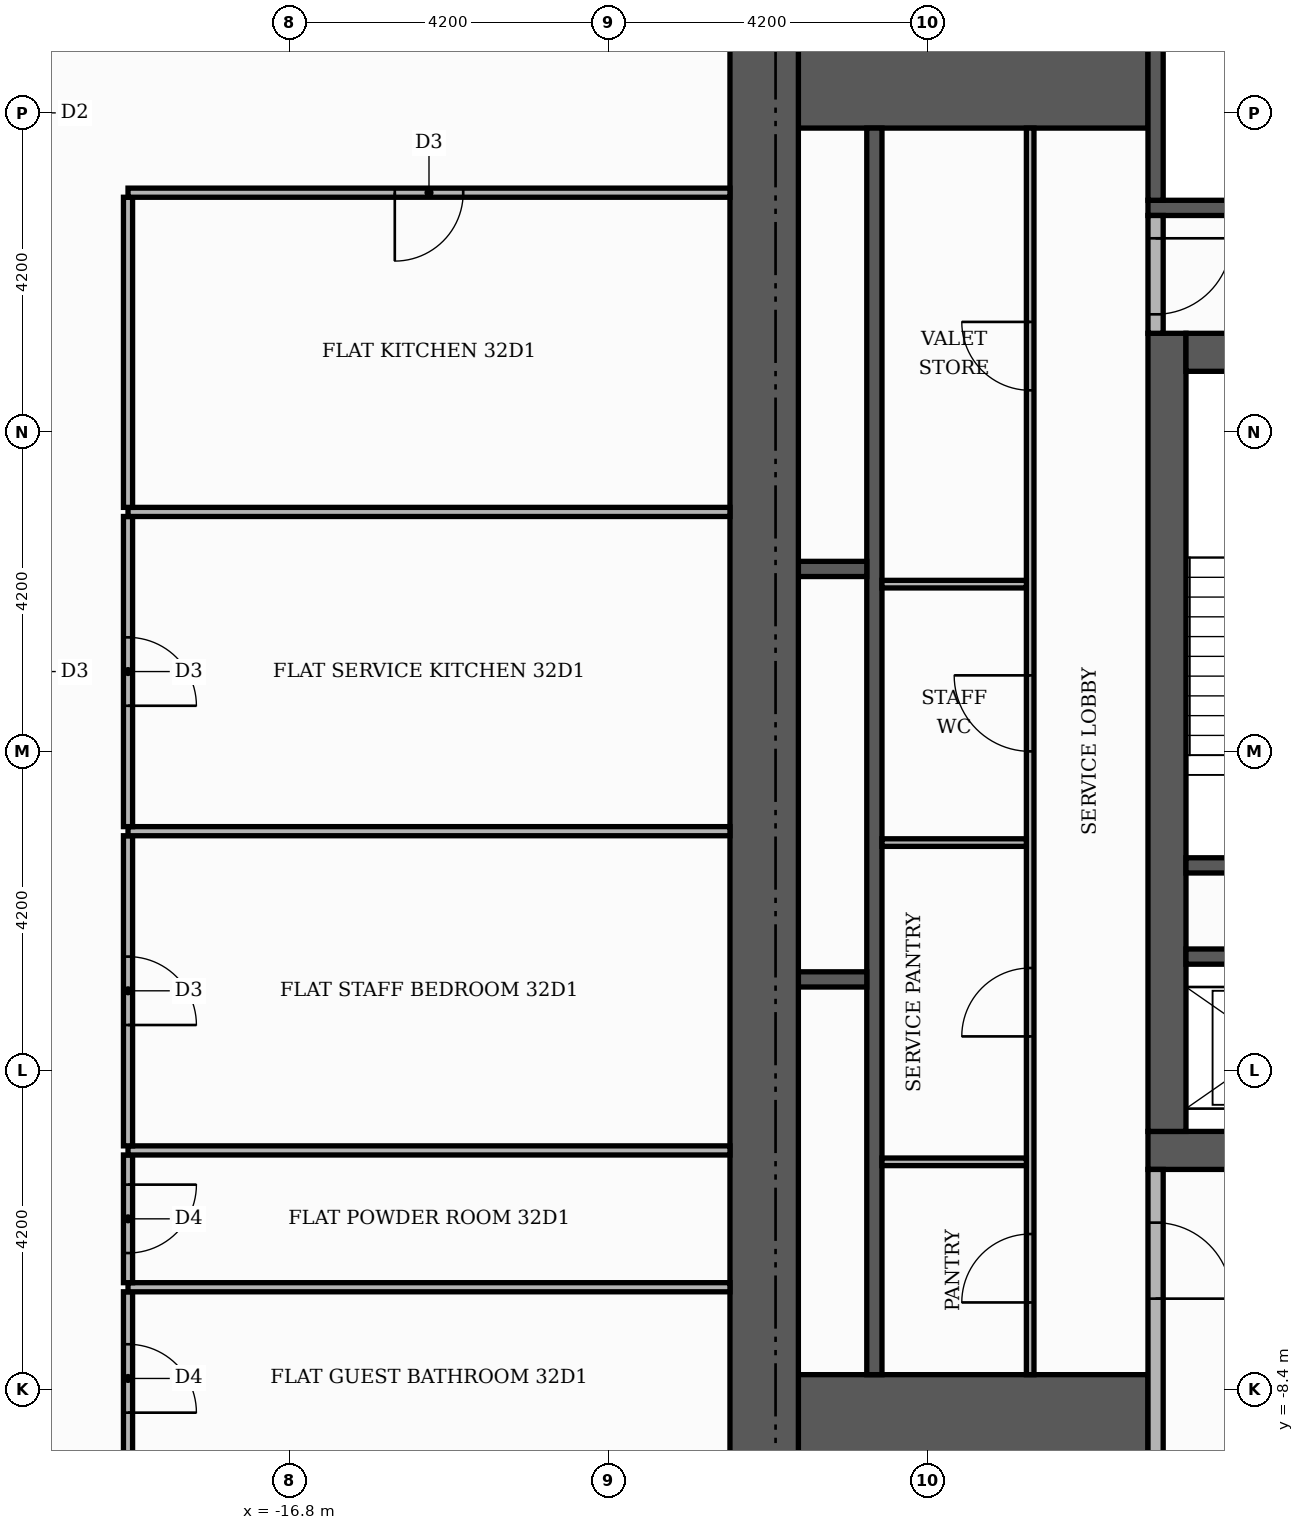
"""IFC4 building model, lengths in metres.
Left out: names, types, materials, properties, quantities, classifications, styles, units other than length and angle.
Written with IfcOpenShell. Run it as: python <this file> out.ifc"""

import sys

from ifc_helpers import new_model, si_unit, direction, frame, frame_2d, origin, place, context, subcontext, project, spatial, rectangle, extrude, element, fill, save


model = new_model("IFC4")
c1 = context("Model", 3, precision=1e-05, world=origin(), true_north=direction((0.0, 1.0)))
c2 = subcontext(c1, "Body", "Model", "MODEL_VIEW")
j1 = project(units=[si_unit("LENGTHUNIT", "METRE"), si_unit("PLANEANGLEUNIT", "RADIAN")], contexts=[c1])
p1 = place(None, origin())
s1 = spatial("IfcSite", under=j1, at=p1, CompositionType="ELEMENT")
p2 = place(p1, origin())
s2 = spatial("IfcBuilding", under=s1, at=p2, CompositionType="ELEMENT")
p3 = place(p2, frame((0.0, 0.0, 137.7)))
s3 = spatial("IfcBuildingStorey", under=s2, at=p3, CompositionType="ELEMENT", Elevation=137.7)
p4 = place(p3, frame((-5.5, -5.25, 0.0), z_axis=(0.0, 0.0, 1.0), x_axis=(1.0, 0.0, 0.0)))
e1 = element("IfcWall", 1, at=p4, inside=s3, PredefinedType="SHEAR", context=c2, shape_type="SweptSolid", body=[
    extrude(rectangle(XDim=11.0, YDim=0.5, at=frame_2d((5.5, 0.0))), origin(), (0.0, 0.0, 1.0), 3.48),
])
p5 = place(p4, frame((4.9, 0.0, 0.0)))
e2 = element("IfcOpeningElement", 2, at=p5, cuts=e1, PredefinedType="OPENING", context=c2, shape_type="SweptSolid", body=[
    extrude(rectangle(XDim=1.2, YDim=2.1, at=frame_2d((0.6, 1.05))), frame((0.0, 0.26, 0.0), z_axis=(0.0, -1.0, 0.0), x_axis=(1.0, 0.0, 0.0)), (0.0, 0.0, 1.0), 0.52),
])
p6 = place(p3, frame((-5.25, -5.0, 0.0), z_axis=(0.0, 0.0, 1.0), x_axis=(0.0, 1.0, 0.0)))
e3 = element("IfcWall", 3, at=p6, inside=s3, PredefinedType="SHEAR", context=c2, shape_type="SweptSolid", body=[
    extrude(rectangle(XDim=10.5, YDim=0.5, at=frame_2d((5.25, 0.0))), origin(), (0.0, 0.0, 1.0), 3.48),
])
p7 = place(p3, frame((-5.0, 5.25, 0.0), z_axis=(0.0, 0.0, 1.0), x_axis=(1.0, 0.0, 0.0)))
e4 = element("IfcWall", 4, at=p7, inside=s3, PredefinedType="SHEAR", context=c2, shape_type="SweptSolid", body=[
    extrude(rectangle(XDim=10.0, YDim=0.5, at=frame_2d((5.0, 0.0))), origin(), (0.0, 0.0, 1.0), 3.48),
])
p8 = place(p7, frame((4.4, 0.0, 0.0)))
e5 = element("IfcOpeningElement", 5, at=p8, cuts=e4, PredefinedType="OPENING", context=c2, shape_type="SweptSolid", body=[
    extrude(rectangle(XDim=1.2, YDim=2.1, at=frame_2d((0.6, 1.05))), frame((0.0, 0.26, 0.0), z_axis=(0.0, -1.0, 0.0), x_axis=(1.0, 0.0, 0.0)), (0.0, 0.0, 1.0), 0.52),
])
for number, where, z_axis, x_axis in (
    (6, (-10.1, -9.15, 0.0), (0.0, 0.0, 1.0), (1.0, 0.0, 0.0)),
    (7, (-10.1, 9.15, 0.0), (0.0, 0.0, 1.0), (1.0, 0.0, 0.0)),
):
    element("IfcWall", number, at=place(p3, frame(where, z_axis=z_axis, x_axis=x_axis)), inside=s3, PredefinedType="SHEAR", context=c2, shape_type="SweptSolid", body=[
        extrude(rectangle(XDim=4.6, YDim=1.9, at=frame_2d((2.3, 0.0))), origin(), (0.0, 0.0, 1.0), 3.48),
    ])
p9 = place(p3, frame((-5.0, -1.5, 0.0), z_axis=(0.0, 0.0, 1.0), x_axis=(1.0, 0.0, 0.0)))
e8 = element("IfcWall", 8, at=p9, inside=s3, PredefinedType="SHEAR", context=c2, shape_type="SweptSolid", body=[
    extrude(rectangle(XDim=3.05, YDim=0.2, at=frame_2d((1.525, 0.0))), origin(), (0.0, 0.0, 1.0), 3.48),
])
p10 = place(p3, frame((-5.5, 7.15, 0.0), z_axis=(0.0, 0.0, 1.0), x_axis=(1.0, 0.0, 0.0)))
e9 = element("IfcWall", 9, at=p10, inside=s3, PredefinedType="SHEAR", context=c2, shape_type="SweptSolid", body=[
    extrude(rectangle(XDim=6.8, YDim=0.2, at=frame_2d((3.4, 0.0))), origin(), (0.0, 0.0, 1.0), 3.48),
])
p11 = place(p3, frame((-5.4, 7.25, 0.0), z_axis=(0.0, 0.0, 1.0), x_axis=(0.0, 1.0, 0.0)))
e10 = element("IfcWall", 10, at=p11, inside=s3, PredefinedType="SHEAR", context=c2, shape_type="SweptSolid", body=[
    extrude(rectangle(XDim=2.85, YDim=0.2, at=frame_2d((1.425, 0.0))), origin(), (0.0, 0.0, 1.0), 3.48),
])
p12 = place(p3, frame((-9.1, -8.2, 0.0), z_axis=(0.0, 0.0, 1.0), x_axis=(0.0, 1.0, 0.0)))
e11 = element("IfcWall", 11, at=p12, inside=s3, PredefinedType="SHEAR", context=c2, shape_type="SweptSolid", body=[
    extrude(rectangle(XDim=16.4, YDim=0.2, at=frame_2d((8.2, 0.0))), origin(), (0.0, 0.0, 1.0), 3.48),
])
p13 = place(p3, frame((-10.1, -3.0, 0.0), z_axis=(0.0, 0.0, 1.0), x_axis=(1.0, 0.0, 0.0)))
e12 = element("IfcWall", 12, at=p13, inside=s3, PredefinedType="SHEAR", context=c2, shape_type="SweptSolid", body=[
    extrude(rectangle(XDim=0.9, YDim=0.2, at=frame_2d((0.45, 0.0))), origin(), (0.0, 0.0, 1.0), 3.48),
])
p14 = place(p3, frame((-5.0, -2.7, 0.0), z_axis=(0.0, 0.0, 1.0), x_axis=(1.0, 0.0, 0.0)))
e13 = element("IfcWall", 13, at=p14, inside=s3, PredefinedType="SHEAR", context=c2, shape_type="SweptSolid", body=[
    extrude(rectangle(XDim=2.85, YDim=0.2, at=frame_2d((1.425, 0.0))), origin(), (0.0, 0.0, 1.0), 3.48),
])
p15 = place(p3, frame((-10.1, 2.4, 0.0), z_axis=(0.0, 0.0, 1.0), x_axis=(1.0, 0.0, 0.0)))
e14 = element("IfcWall", 14, at=p15, inside=s3, PredefinedType="SHEAR", context=c2, shape_type="SweptSolid", body=[
    extrude(rectangle(XDim=0.9, YDim=0.2, at=frame_2d((0.45, 0.0))), origin(), (0.0, 0.0, 1.0), 3.48),
])
p16 = place(p3, frame((-10.55, -10.1, 0.0), z_axis=(0.0, 0.0, 1.0), x_axis=(0.0, 1.0, 0.0)))
e15 = element("IfcWall", 15, at=p16, inside=s3, PredefinedType="SHEAR", context=c2, shape_type="SweptSolid", body=[
    extrude(rectangle(XDim=20.2, YDim=0.9, at=frame_2d((10.1, 0.0))), origin(), (0.0, 0.0, 1.0), 3.48),
])
p17 = place(p3, frame((-5.4, -10.1, 0.0), z_axis=(0.0, 0.0, 1.0), x_axis=(0.0, 1.0, 0.0)))
e16 = element("IfcWall", 16, at=p17, inside=s3, PredefinedType="PARTITIONING", context=c2, shape_type="SweptSolid", body=[
    extrude(rectangle(XDim=4.6, YDim=0.2, at=frame_2d((2.3, 0.0))), origin(), (0.0, 0.0, 1.0), 3.48),
])
p18 = place(p17, frame((2.9, 0.0, 0.0)))
e17 = element("IfcOpeningElement", 17, at=p18, cuts=e16, PredefinedType="OPENING", context=c2, shape_type="SweptSolid", body=[
    extrude(rectangle(XDim=1.0, YDim=2.1, at=frame_2d((0.5, 1.05))), frame((0.0, 0.11, 0.0), z_axis=(0.0, -1.0, 0.0), x_axis=(1.0, 0.0, 0.0)), (0.0, 0.0, 1.0), 0.22),
])
p19 = place(p3, frame((-7.05, -8.2, 0.0), z_axis=(0.0, 0.0, 1.0), x_axis=(0.0, 1.0, 0.0)))
e18 = element("IfcWall", 18, at=p19, inside=s3, PredefinedType="PARTITIONING", context=c2, shape_type="SweptSolid", body=[
    extrude(rectangle(XDim=16.4, YDim=0.1, at=frame_2d((8.2, 0.0))), origin(), (0.0, 0.0, 1.0), 3.48),
])
p20 = place(p19, frame((0.95, 0.0, 0.0)))
e19 = element("IfcOpeningElement", 19, at=p20, cuts=e18, PredefinedType="OPENING", context=c2, shape_type="SweptSolid", body=[
    extrude(rectangle(XDim=0.9, YDim=2.1, at=frame_2d((0.45, 1.05))), frame((0.0, 0.06, 0.0), z_axis=(0.0, -1.0, 0.0), x_axis=(1.0, 0.0, 0.0)), (0.0, 0.0, 1.0), 0.12),
])
p21 = place(p19, frame((4.45, 0.0, 0.0)))
e20 = element("IfcOpeningElement", 20, at=p21, cuts=e18, PredefinedType="OPENING", context=c2, shape_type="SweptSolid", body=[
    extrude(rectangle(XDim=0.9, YDim=2.1, at=frame_2d((0.45, 1.05))), frame((0.0, 0.06, 0.0), z_axis=(0.0, -1.0, 0.0), x_axis=(1.0, 0.0, 0.0)), (0.0, 0.0, 1.0), 0.12),
])
p22 = place(p19, frame((8.2, 0.0, 0.0)))
e21 = element("IfcOpeningElement", 21, at=p22, cuts=e18, PredefinedType="OPENING", context=c2, shape_type="SweptSolid", body=[
    extrude(rectangle(XDim=1.0, YDim=2.1, at=frame_2d((0.5, 1.05))), frame((0.0, 0.06, 0.0), z_axis=(0.0, -1.0, 0.0), x_axis=(1.0, 0.0, 0.0)), (0.0, 0.0, 1.0), 0.12),
])
p23 = place(p19, frame((12.95, 0.0, 0.0)))
e22 = element("IfcOpeningElement", 22, at=p23, cuts=e18, PredefinedType="OPENING", context=c2, shape_type="SweptSolid", body=[
    extrude(rectangle(XDim=0.9, YDim=2.1, at=frame_2d((0.45, 1.05))), frame((0.0, 0.06, 0.0), z_axis=(0.0, -1.0, 0.0), x_axis=(1.0, 0.0, 0.0)), (0.0, 0.0, 1.0), 0.12),
])
for number, where, z_axis, x_axis in (
    (23, (-9.0, -5.4, 0.0), (0.0, 0.0, 1.0), (1.0, 0.0, 0.0)),
    (24, (-9.0, -1.2, 0.0), (0.0, 0.0, 1.0), (1.0, 0.0, 0.0)),
    (25, (-9.0, 2.2, 0.0), (0.0, 0.0, 1.0), (1.0, 0.0, 0.0)),
):
    element("IfcWall", number, at=place(p3, frame(where, z_axis=z_axis, x_axis=x_axis)), inside=s3, PredefinedType="PARTITIONING", context=c2, shape_type="SweptSolid", body=[
        extrude(rectangle(XDim=1.9, YDim=0.1, at=frame_2d((0.95, 0.0))), origin(), (0.0, 0.0, 1.0), 3.48),
    ])
p24 = place(p3, frame((-5.4, 5.5, 0.0), z_axis=(0.0, 0.0, 1.0), x_axis=(0.0, 1.0, 0.0)))
e26 = element("IfcWall", 26, at=p24, inside=s3, PredefinedType="PARTITIONING", context=c2, shape_type="SweptSolid", body=[
    extrude(rectangle(XDim=1.55, YDim=0.2, at=frame_2d((0.775, 0.0))), origin(), (0.0, 0.0, 1.0), 3.48),
])
p25 = place(p24, frame((0.25, 0.0, 0.0)))
e27 = element("IfcOpeningElement", 27, at=p25, cuts=e26, PredefinedType="OPENING", context=c2, shape_type="SweptSolid", body=[
    extrude(rectangle(XDim=1.0, YDim=2.1, at=frame_2d((0.5, 1.05))), frame((0.0, 0.11, 0.0), z_axis=(0.0, -1.0, 0.0), x_axis=(1.0, 0.0, 0.0)), (0.0, 0.0, 1.0), 0.22),
])
p26 = place(p3, frame((-18.92, -9.39, 0.0), z_axis=(0.0, 0.0, 1.0), x_axis=(0.0, 1.0, 0.0)))
e28 = element("IfcWall", 28, at=p26, inside=s3, PredefinedType="PARTITIONING", context=c2, shape_type="SweptSolid", body=[
    extrude(rectangle(XDim=2.28, YDim=0.12, at=frame_2d((1.14, 0.0))), origin(), (0.0, 0.0, 1.0), 3.48),
])
p27 = place(p26, frame((0.69, 0.0, 0.0)))
e29 = element("IfcOpeningElement", 29, at=p27, cuts=e28, PredefinedType="OPENING", context=c2, shape_type="SweptSolid", body=[
    extrude(rectangle(XDim=0.9, YDim=2.1, at=frame_2d((0.45, 1.05))), frame((0.0, 0.07, 0.0), z_axis=(0.0, -1.0, 0.0), x_axis=(1.0, 0.0, 0.0)), (0.0, 0.0, 1.0), 0.14),
])
p28 = place(p3, frame((-18.92, -7.05, 0.0), z_axis=(0.0, 0.0, 1.0), x_axis=(1.0, 0.0, 0.0)))
e30 = element("IfcWall", 30, at=p28, inside=s3, PredefinedType="PARTITIONING", context=c2, shape_type="SweptSolid", body=[
    extrude(rectangle(XDim=7.92, YDim=0.12, at=frame_2d((3.96, 0.0))), origin(), (0.0, 0.0, 1.0), 3.48),
])
p29 = place(p3, frame((-18.92, -6.99, 0.0), z_axis=(0.0, 0.0, 1.0), x_axis=(0.0, 1.0, 0.0)))
e31 = element("IfcWall", 31, at=p29, inside=s3, PredefinedType="PARTITIONING", context=c2, shape_type="SweptSolid", body=[
    extrude(rectangle(XDim=1.68, YDim=0.12, at=frame_2d((0.84, 0.0))), origin(), (0.0, 0.0, 1.0), 3.48),
])
p30 = place(p29, frame((0.39, 0.0, 0.0)))
e32 = element("IfcOpeningElement", 32, at=p30, cuts=e31, PredefinedType="OPENING", context=c2, shape_type="SweptSolid", body=[
    extrude(rectangle(XDim=0.9, YDim=2.1, at=frame_2d((0.45, 1.05))), frame((0.0, 0.07, 0.0), z_axis=(0.0, -1.0, 0.0), x_axis=(1.0, 0.0, 0.0)), (0.0, 0.0, 1.0), 0.14),
])
p31 = place(p3, frame((-18.92, -5.25, 0.0), z_axis=(0.0, 0.0, 1.0), x_axis=(1.0, 0.0, 0.0)))
e33 = element("IfcWall", 33, at=p31, inside=s3, PredefinedType="PARTITIONING", context=c2, shape_type="SweptSolid", body=[
    extrude(rectangle(XDim=7.92, YDim=0.12, at=frame_2d((3.96, 0.0))), origin(), (0.0, 0.0, 1.0), 3.48),
])
p32 = place(p3, frame((-18.92, -5.19, 0.0), z_axis=(0.0, 0.0, 1.0), x_axis=(0.0, 1.0, 0.0)))
e34 = element("IfcWall", 34, at=p32, inside=s3, PredefinedType="PARTITIONING", context=c2, shape_type="SweptSolid", body=[
    extrude(rectangle(XDim=4.08, YDim=0.12, at=frame_2d((2.04, 0.0))), origin(), (0.0, 0.0, 1.0), 3.48),
])
p33 = place(p32, frame((1.59, 0.0, 0.0)))
e35 = element("IfcOpeningElement", 35, at=p33, cuts=e34, PredefinedType="OPENING", context=c2, shape_type="SweptSolid", body=[
    extrude(rectangle(XDim=0.9, YDim=2.1, at=frame_2d((0.45, 1.05))), frame((0.0, 0.07, 0.0), z_axis=(0.0, -1.0, 0.0), x_axis=(1.0, 0.0, 0.0)), (0.0, 0.0, 1.0), 0.14),
])
p34 = place(p3, frame((-18.92, -1.05, 0.0), z_axis=(0.0, 0.0, 1.0), x_axis=(1.0, 0.0, 0.0)))
e36 = element("IfcWall", 36, at=p34, inside=s3, PredefinedType="PARTITIONING", context=c2, shape_type="SweptSolid", body=[
    extrude(rectangle(XDim=7.92, YDim=0.12, at=frame_2d((3.96, 0.0))), origin(), (0.0, 0.0, 1.0), 3.48),
])
p35 = place(p3, frame((-18.92, -0.99, 0.0), z_axis=(0.0, 0.0, 1.0), x_axis=(0.0, 1.0, 0.0)))
e37 = element("IfcWall", 37, at=p35, inside=s3, PredefinedType="PARTITIONING", context=c2, shape_type="SweptSolid", body=[
    extrude(rectangle(XDim=4.08, YDim=0.12, at=frame_2d((2.04, 0.0))), origin(), (0.0, 0.0, 1.0), 3.48),
])
p36 = place(p35, frame((1.59, 0.0, 0.0)))
e38 = element("IfcOpeningElement", 38, at=p36, cuts=e37, PredefinedType="OPENING", context=c2, shape_type="SweptSolid", body=[
    extrude(rectangle(XDim=0.9, YDim=2.1, at=frame_2d((0.45, 1.05))), frame((0.0, 0.07, 0.0), z_axis=(0.0, -1.0, 0.0), x_axis=(1.0, 0.0, 0.0)), (0.0, 0.0, 1.0), 0.14),
])
p37 = place(p3, frame((-18.92, 3.15, 0.0), z_axis=(0.0, 0.0, 1.0), x_axis=(1.0, 0.0, 0.0)))
e39 = element("IfcWall", 39, at=p37, inside=s3, PredefinedType="PARTITIONING", context=c2, shape_type="SweptSolid", body=[
    extrude(rectangle(XDim=7.92, YDim=0.12, at=frame_2d((3.96, 0.0))), origin(), (0.0, 0.0, 1.0), 3.48),
])
p38 = place(p3, frame((-18.92, 3.21, 0.0), z_axis=(0.0, 0.0, 1.0), x_axis=(0.0, 1.0, 0.0)))
e40 = element("IfcWall", 40, at=p38, inside=s3, PredefinedType="PARTITIONING", context=c2, shape_type="SweptSolid", body=[
    extrude(rectangle(XDim=4.08, YDim=0.12, at=frame_2d((2.04, 0.0))), origin(), (0.0, 0.0, 1.0), 3.48),
])
p39 = place(p3, frame((-18.92, 7.35, 0.0), z_axis=(0.0, 0.0, 1.0), x_axis=(1.0, 0.0, 0.0)))
e41 = element("IfcWall", 41, at=p39, inside=s3, PredefinedType="PARTITIONING", context=c2, shape_type="SweptSolid", body=[
    extrude(rectangle(XDim=7.92, YDim=0.12, at=frame_2d((3.96, 0.0))), origin(), (0.0, 0.0, 1.0), 3.48),
])
p40 = place(p39, frame((3.51, 0.0, 0.0)))
e42 = element("IfcOpeningElement", 42, at=p40, cuts=e41, PredefinedType="OPENING", context=c2, shape_type="SweptSolid", body=[
    extrude(rectangle(XDim=0.9, YDim=2.1, at=frame_2d((0.45, 1.05))), frame((0.0, 0.07, 0.0), z_axis=(0.0, -1.0, 0.0), x_axis=(1.0, 0.0, 0.0)), (0.0, 0.0, 1.0), 0.14),
])
p41 = place(p25, frame((1.0, 0.0, 0.0), z_axis=(0.0, 0.0, 1.0), x_axis=(-1.0, 0.0, 0.0)))
e43 = element("IfcDoor", 43, at=p41, inside=s3, OperationType="SINGLE_SWING_RIGHT", PredefinedType="DOOR", context=c2, shape_type="SweptSolid", body=[
    extrude(rectangle(XDim=1.0, YDim=2.1, at=frame_2d((0.5, 1.05))), frame((0.0, 0.025, 0.0), z_axis=(0.0, -1.0, 0.0), x_axis=(1.0, 0.0, 0.0)), (0.0, 0.0, 1.0), 0.05),
])
fill(e27, e43)
p42 = place(p18, frame((1.0, 0.0, 0.0), z_axis=(0.0, 0.0, 1.0), x_axis=(-1.0, 0.0, 0.0)))
e44 = element("IfcDoor", 44, at=p42, inside=s3, OperationType="SINGLE_SWING_LEFT", PredefinedType="DOOR", context=c2, shape_type="SweptSolid", body=[
    extrude(rectangle(XDim=1.0, YDim=2.1, at=frame_2d((0.5, 1.05))), frame((0.0, 0.025, 0.0), z_axis=(0.0, -1.0, 0.0), x_axis=(1.0, 0.0, 0.0)), (0.0, 0.0, 1.0), 0.05),
])
fill(e17, e44)
p43 = place(p20, origin())
e45 = element("IfcDoor", 45, at=p43, inside=s3, OperationType="SINGLE_SWING_LEFT", PredefinedType="DOOR", context=c2, shape_type="SweptSolid", body=[
    extrude(rectangle(XDim=0.9, YDim=2.1, at=frame_2d((0.45, 1.05))), frame((0.0, 0.025, 0.0), z_axis=(0.0, -1.0, 0.0), x_axis=(1.0, 0.0, 0.0)), (0.0, 0.0, 1.0), 0.05),
])
fill(e19, e45)
p44 = place(p21, origin())
e46 = element("IfcDoor", 46, at=p44, inside=s3, OperationType="SINGLE_SWING_LEFT", PredefinedType="DOOR", context=c2, shape_type="SweptSolid", body=[
    extrude(rectangle(XDim=0.9, YDim=2.1, at=frame_2d((0.45, 1.05))), frame((0.0, 0.025, 0.0), z_axis=(0.0, -1.0, 0.0), x_axis=(1.0, 0.0, 0.0)), (0.0, 0.0, 1.0), 0.05),
])
fill(e20, e46)
p45 = place(p22, origin())
e47 = element("IfcDoor", 47, at=p45, inside=s3, OperationType="SINGLE_SWING_RIGHT", PredefinedType="DOOR", context=c2, shape_type="SweptSolid", body=[
    extrude(rectangle(XDim=1.0, YDim=2.1, at=frame_2d((0.5, 1.05))), frame((0.0, 0.025, 0.0), z_axis=(0.0, -1.0, 0.0), x_axis=(1.0, 0.0, 0.0)), (0.0, 0.0, 1.0), 0.05),
])
fill(e21, e47)
p46 = place(p23, origin())
e48 = element("IfcDoor", 48, at=p46, inside=s3, OperationType="SINGLE_SWING_RIGHT", PredefinedType="DOOR", context=c2, shape_type="SweptSolid", body=[
    extrude(rectangle(XDim=0.9, YDim=2.1, at=frame_2d((0.45, 1.05))), frame((0.0, 0.025, 0.0), z_axis=(0.0, -1.0, 0.0), x_axis=(1.0, 0.0, 0.0)), (0.0, 0.0, 1.0), 0.05),
])
fill(e22, e48)
p47 = place(p40, frame((0.9, 0.0, 0.0), z_axis=(0.0, 0.0, 1.0), x_axis=(-1.0, 0.0, 0.0)))
e49 = element("IfcDoor", 49, at=p47, inside=s3, OperationType="SINGLE_SWING_LEFT", PredefinedType="DOOR", context=c2, shape_type="SweptSolid", body=[
    extrude(rectangle(XDim=0.9, YDim=2.1, at=frame_2d((0.45, 1.05))), frame((0.0, 0.025, 0.0), z_axis=(0.0, -1.0, 0.0), x_axis=(1.0, 0.0, 0.0)), (0.0, 0.0, 1.0), 0.05),
])
fill(e42, e49)
p48 = place(p36, frame((0.9, 0.0, 0.0), z_axis=(0.0, 0.0, 1.0), x_axis=(-1.0, 0.0, 0.0)))
e50 = element("IfcDoor", 50, at=p48, inside=s3, OperationType="SINGLE_SWING_LEFT", PredefinedType="DOOR", context=c2, shape_type="SweptSolid", body=[
    extrude(rectangle(XDim=0.9, YDim=2.1, at=frame_2d((0.45, 1.05))), frame((0.0, 0.025, 0.0), z_axis=(0.0, -1.0, 0.0), x_axis=(1.0, 0.0, 0.0)), (0.0, 0.0, 1.0), 0.05),
])
fill(e38, e50)
p49 = place(p33, frame((0.9, 0.0, 0.0), z_axis=(0.0, 0.0, 1.0), x_axis=(-1.0, 0.0, 0.0)))
e51 = element("IfcDoor", 51, at=p49, inside=s3, OperationType="SINGLE_SWING_LEFT", PredefinedType="DOOR", context=c2, shape_type="SweptSolid", body=[
    extrude(rectangle(XDim=0.9, YDim=2.1, at=frame_2d((0.45, 1.05))), frame((0.0, 0.025, 0.0), z_axis=(0.0, -1.0, 0.0), x_axis=(1.0, 0.0, 0.0)), (0.0, 0.0, 1.0), 0.05),
])
fill(e35, e51)
p50 = place(p30, frame((0.9, 0.0, 0.0), z_axis=(0.0, 0.0, 1.0), x_axis=(-1.0, 0.0, 0.0)))
e52 = element("IfcDoor", 52, at=p50, inside=s3, OperationType="SINGLE_SWING_RIGHT", PredefinedType="DOOR", context=c2, shape_type="SweptSolid", body=[
    extrude(rectangle(XDim=0.9, YDim=2.1, at=frame_2d((0.45, 1.05))), frame((0.0, 0.025, 0.0), z_axis=(0.0, -1.0, 0.0), x_axis=(1.0, 0.0, 0.0)), (0.0, 0.0, 1.0), 0.05),
])
fill(e32, e52)
p51 = place(p27, frame((0.9, 0.0, 0.0), z_axis=(0.0, 0.0, 1.0), x_axis=(-1.0, 0.0, 0.0)))
e53 = element("IfcDoor", 53, at=p51, inside=s3, OperationType="SINGLE_SWING_LEFT", PredefinedType="DOOR", context=c2, shape_type="SweptSolid", body=[
    extrude(rectangle(XDim=0.9, YDim=2.1, at=frame_2d((0.45, 1.05))), frame((0.0, 0.025, 0.0), z_axis=(0.0, -1.0, 0.0), x_axis=(1.0, 0.0, 0.0)), (0.0, 0.0, 1.0), 0.05),
])
fill(e29, e53)
save(model, sys.argv[1])
